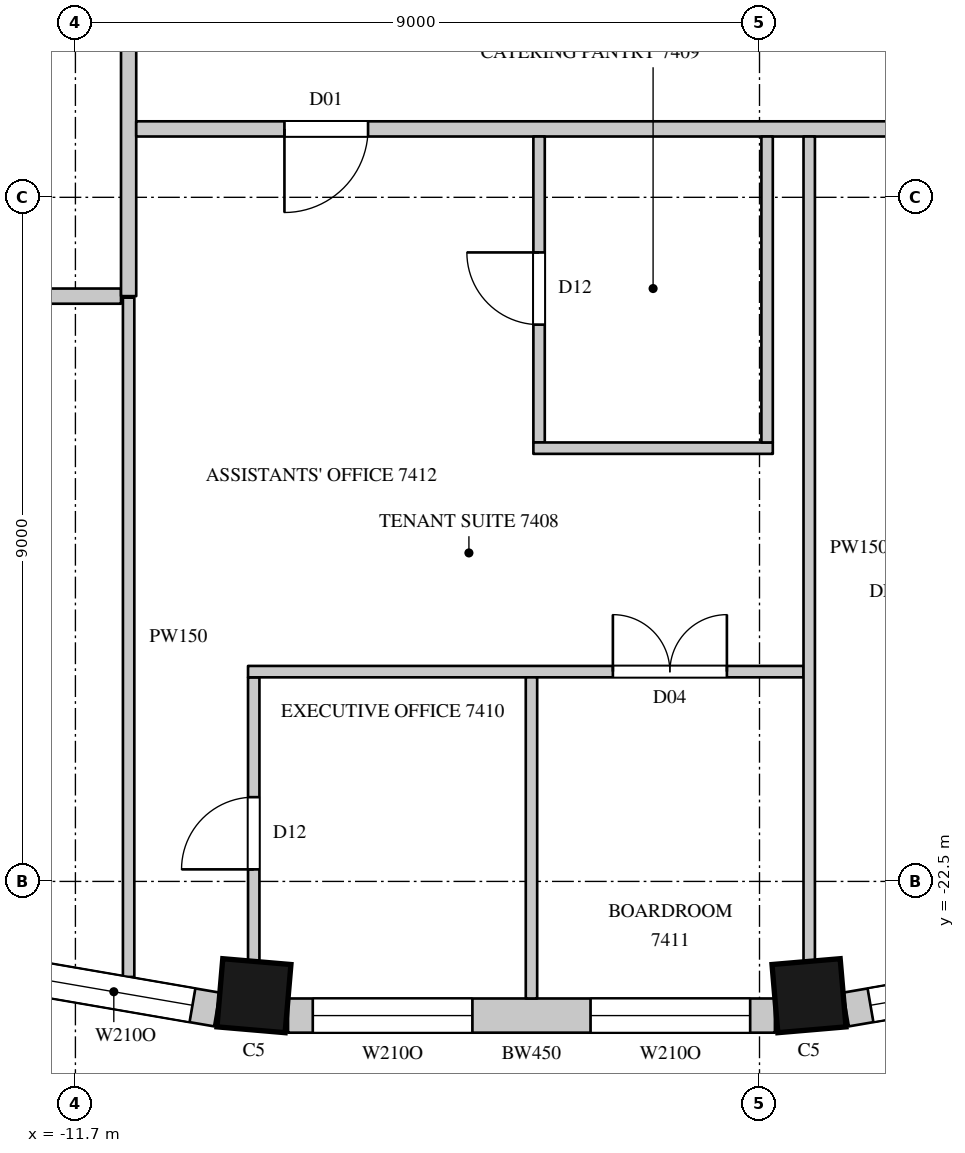
"""IFC4 building model, lengths in metres.
Left out: names, types, materials, properties, quantities, classifications, styles, units other than length and angle.
Written with IfcOpenShell. Run it as: python <this file> out.ifc"""

import sys

from ifc_helpers import new_model, si_unit, direction, frame, frame_2d, origin, origin_2d, place, context, subcontext, project, spatial, rectangle, extrude, element, fill, save


model = new_model("IFC4")
c1 = context("Model", 3, precision=1e-05, world=origin(), true_north=direction((0.0, 1.0)))
c2 = subcontext(c1, "Body", "Model", "MODEL_VIEW")
j1 = project(units=[si_unit("LENGTHUNIT", "METRE"), si_unit("PLANEANGLEUNIT", "RADIAN")], contexts=[c1])
p1 = place(None, origin())
s1 = spatial("IfcSite", under=j1, at=p1, CompositionType="ELEMENT")
p2 = place(p1, origin())
s2 = spatial("IfcBuilding", under=s1, at=p2, CompositionType="ELEMENT")
p3 = place(p2, frame((0.0, 0.0, 325.4)))
s3 = spatial("IfcBuildingStorey", under=s2, at=p3, CompositionType="ELEMENT", Elevation=325.4)
for number, where, z_axis, x_axis in (
    (1, (-9.351, -24.003, 0.0), (0.0, 0.0, 1.0), (0.996, -0.085, 0.0)),
    (2, (-2.049, -24.003, 0.0), (0.0, 0.0, 1.0), (0.996, 0.085, 0.0)),
):
    element("IfcColumn", number, at=place(p3, frame(where, z_axis=z_axis, x_axis=x_axis)), inside=s3, PredefinedType="COLUMN", context=c2, shape_type="SweptSolid", body=[
        extrude(rectangle(XDim=0.9, YDim=0.9, at=origin_2d()), origin(), (0.0, 0.0, 1.0), 4.1),
    ])
p4 = place(p3, frame((-16.157, -23.097, 0.0), z_axis=(0.0, 0.0, 1.0), x_axis=(0.985502073964, -0.169663379113, 0.0)))
e3 = element("IfcWall", 3, at=p4, inside=s3, PredefinedType="SOLIDWALL", context=c2, shape_type="SweptSolid", body=[
    extrude(rectangle(XDim=6.412, YDim=0.45, at=frame_2d((3.206, 0.0))), origin(), (0.0, 0.0, 1.0), 3.8),
])
p5 = place(p4, frame((0.327, 0.0, 1.05)))
e4 = element("IfcOpeningElement", 4, at=p5, cuts=e3, PredefinedType="OPENING", context=c2, shape_type="SweptSolid", body=[
    extrude(rectangle(XDim=2.1, YDim=2.4, at=frame_2d((1.05, 1.2))), frame((0.0, 0.235, 0.0), z_axis=(0.0, -1.0, 0.0), x_axis=(1.0, 0.0, 0.0)), (0.0, 0.0, 1.0), 0.47),
])
p6 = place(p4, frame((3.985, 0.0, 1.05)))
e5 = element("IfcOpeningElement", 5, at=p6, cuts=e3, PredefinedType="OPENING", context=c2, shape_type="SweptSolid", body=[
    extrude(rectangle(XDim=2.1, YDim=2.4, at=frame_2d((1.05, 1.2))), frame((0.0, 0.235, 0.0), z_axis=(0.0, -1.0, 0.0), x_axis=(1.0, 0.0, 0.0)), (0.0, 0.0, 1.0), 0.47),
])
p7 = place(p3, frame((-8.903, -24.265, 0.0), z_axis=(0.0, 0.0, 1.0), x_axis=(1.0, 0.0, 0.0)))
e6 = element("IfcWall", 6, at=p7, inside=s3, PredefinedType="SOLIDWALL", context=c2, shape_type="SweptSolid", body=[
    extrude(rectangle(XDim=6.406, YDim=0.45, at=frame_2d((3.203, 0.0))), origin(), (0.0, 0.0, 1.0), 3.8),
])
p8 = place(p7, frame((0.325, 0.0, 1.05)))
e7 = element("IfcOpeningElement", 7, at=p8, cuts=e6, PredefinedType="OPENING", context=c2, shape_type="SweptSolid", body=[
    extrude(rectangle(XDim=2.1, YDim=2.4, at=frame_2d((1.05, 1.2))), frame((0.0, 0.235, 0.0), z_axis=(0.0, -1.0, 0.0), x_axis=(1.0, 0.0, 0.0)), (0.0, 0.0, 1.0), 0.47),
])
p9 = place(p7, frame((3.98, 0.0, 1.05)))
e8 = element("IfcOpeningElement", 8, at=p9, cuts=e6, PredefinedType="OPENING", context=c2, shape_type="SweptSolid", body=[
    extrude(rectangle(XDim=2.1, YDim=2.4, at=frame_2d((1.05, 1.2))), frame((0.0, 0.235, 0.0), z_axis=(0.0, -1.0, 0.0), x_axis=(1.0, 0.0, 0.0)), (0.0, 0.0, 1.0), 0.47),
])
p10 = place(p3, frame((-1.562, -24.185, 0.0), z_axis=(0.0, 0.0, 1.0), x_axis=(0.985502073964, 0.169663379113, 0.0)))
e9 = element("IfcWall", 9, at=p10, inside=s3, PredefinedType="SOLIDWALL", context=c2, shape_type="SweptSolid", body=[
    extrude(rectangle(XDim=6.412, YDim=0.45, at=frame_2d((3.206, 0.0))), origin(), (0.0, 0.0, 1.0), 3.8),
])
p11 = place(p10, frame((0.327, 0.0, 1.05)))
e10 = element("IfcOpeningElement", 10, at=p11, cuts=e9, PredefinedType="OPENING", context=c2, shape_type="SweptSolid", body=[
    extrude(rectangle(XDim=2.1, YDim=2.4, at=frame_2d((1.05, 1.2))), frame((0.0, 0.235, 0.0), z_axis=(0.0, -1.0, 0.0), x_axis=(1.0, 0.0, 0.0)), (0.0, 0.0, 1.0), 0.47),
])
p12 = place(p10, frame((3.985, 0.0, 1.05)))
e11 = element("IfcOpeningElement", 11, at=p12, cuts=e9, PredefinedType="OPENING", context=c2, shape_type="SweptSolid", body=[
    extrude(rectangle(XDim=2.1, YDim=2.4, at=frame_2d((1.05, 1.2))), frame((0.0, 0.235, 0.0), z_axis=(0.0, -1.0, 0.0), x_axis=(1.0, 0.0, 0.0)), (0.0, 0.0, 1.0), 0.47),
])
p13 = place(p3, frame((-13.97, -14.8, 0.0), z_axis=(0.0, 0.0, 1.0), x_axis=(1.0, 0.0, 0.0)))
e12 = element("IfcWall", 12, at=p13, inside=s3, PredefinedType="PARTITIONING", context=c2, shape_type="SweptSolid", body=[
    extrude(rectangle(XDim=2.87, YDim=0.2, at=frame_2d((1.435, 0.0))), origin(), (0.0, 0.0, 1.0), 3.8),
])
p14 = place(p3, frame((-11.0, -14.8, 0.0), z_axis=(0.0, 0.0, 1.0), x_axis=(0.0, 1.0, 0.0)))
e13 = element("IfcWall", 13, at=p14, inside=s3, PredefinedType="PARTITIONING", context=c2, shape_type="SweptSolid", body=[
    extrude(rectangle(XDim=29.5, YDim=0.2, at=frame_2d((14.75, 0.0))), origin(), (0.0, 0.0, 1.0), 3.8),
])
p15 = place(p14, frame((7.75, 0.0, 0.0)))
e14 = element("IfcOpeningElement", 14, at=p15, cuts=e13, PredefinedType="OPENING", context=c2, shape_type="SweptSolid", body=[
    extrude(rectangle(XDim=1.5, YDim=2.4, at=frame_2d((0.75, 1.2))), frame((0.0, 0.11, 0.0), z_axis=(0.0, -1.0, 0.0), x_axis=(1.0, 0.0, 0.0)), (0.0, 0.0, 1.0), 0.22),
])
p16 = place(p3, frame((-10.9, -12.6, 0.0), z_axis=(0.0, 0.0, 1.0), x_axis=(1.0, 0.0, 0.0)))
e15 = element("IfcWall", 15, at=p16, inside=s3, PredefinedType="PARTITIONING", context=c2, shape_type="SweptSolid", body=[
    extrude(rectangle(XDim=22.6, YDim=0.2, at=frame_2d((11.3, 0.0))), origin(), (0.0, 0.0, 1.0), 3.8),
])
p17 = place(p16, frame((14.1, 0.0, 0.0)))
e16 = element("IfcOpeningElement", 16, at=p17, cuts=e15, PredefinedType="OPENING", context=c2, shape_type="SweptSolid", body=[
    extrude(rectangle(XDim=0.9, YDim=2.2, at=frame_2d((0.45, 1.1))), frame((0.0, 0.11, 0.0), z_axis=(0.0, -1.0, 0.0), x_axis=(1.0, 0.0, 0.0)), (0.0, 0.0, 1.0), 0.22),
])
p18 = place(p16, frame((17.4, 0.0, 0.0)))
e17 = element("IfcOpeningElement", 17, at=p18, cuts=e15, PredefinedType="OPENING", context=c2, shape_type="SweptSolid", body=[
    extrude(rectangle(XDim=0.9, YDim=2.2, at=frame_2d((0.45, 1.1))), frame((0.0, 0.11, 0.0), z_axis=(0.0, -1.0, 0.0), x_axis=(1.0, 0.0, 0.0)), (0.0, 0.0, 1.0), 0.22),
])
p19 = place(p16, frame((20.25, 0.0, 0.0)))
e18 = element("IfcOpeningElement", 18, at=p19, cuts=e15, PredefinedType="OPENING", context=c2, shape_type="SweptSolid", body=[
    extrude(rectangle(XDim=0.9, YDim=2.2, at=frame_2d((0.45, 1.1))), frame((0.0, 0.11, 0.0), z_axis=(0.0, -1.0, 0.0), x_axis=(1.0, 0.0, 0.0)), (0.0, 0.0, 1.0), 0.22),
])
p20 = place(p16, frame((1.95, 0.0, 0.0)))
e19 = element("IfcOpeningElement", 19, at=p20, cuts=e15, PredefinedType="OPENING", context=c2, shape_type="SweptSolid", body=[
    extrude(rectangle(XDim=1.1, YDim=2.4, at=frame_2d((0.55, 1.2))), frame((0.0, 0.11, 0.0), z_axis=(0.0, -1.0, 0.0), x_axis=(1.0, 0.0, 0.0)), (0.0, 0.0, 1.0), 0.22),
])
p21 = place(p16, frame((9.95, 0.0, 0.0)))
e20 = element("IfcOpeningElement", 20, at=p21, cuts=e15, PredefinedType="OPENING", context=c2, shape_type="SweptSolid", body=[
    extrude(rectangle(XDim=1.1, YDim=2.4, at=frame_2d((0.55, 1.2))), frame((0.0, 0.11, 0.0), z_axis=(0.0, -1.0, 0.0), x_axis=(1.0, 0.0, 0.0)), (0.0, 0.0, 1.0), 0.22),
])
p22 = place(p3, frame((-11.0, -23.757, 0.0), z_axis=(0.0, 0.0, 1.0), x_axis=(0.0, 1.0, 0.0)))
e21 = element("IfcWall", 21, at=p22, inside=s3, PredefinedType="PARTITIONING", context=c2, shape_type="SweptSolid", body=[
    extrude(rectangle(XDim=8.937, YDim=0.15, at=frame_2d((4.468, 0.0))), origin(), (0.0, 0.0, 1.0), 3.8),
])
p23 = place(p3, frame((-9.354, -23.542, 0.0), z_axis=(0.0, 0.0, 1.0), x_axis=(0.0, 1.0, 0.0)))
e22 = element("IfcWall", 22, at=p23, inside=s3, PredefinedType="PARTITIONING", context=c2, shape_type="SweptSolid", body=[
    extrude(rectangle(XDim=3.727, YDim=0.15, at=frame_2d((1.863, 0.0))), origin(), (0.0, 0.0, 1.0), 3.8),
])
p24 = place(p23, frame((1.2, 0.0, 0.0)))
e23 = element("IfcOpeningElement", 23, at=p24, cuts=e22, PredefinedType="OPENING", context=c2, shape_type="SweptSolid", body=[
    extrude(rectangle(XDim=0.95, YDim=2.2, at=frame_2d((0.475, 1.1))), frame((0.0, 0.085, 0.0), z_axis=(0.0, -1.0, 0.0), x_axis=(1.0, 0.0, 0.0)), (0.0, 0.0, 1.0), 0.17),
])
p25 = place(p3, frame((-9.429, -19.74, 0.0), z_axis=(0.0, 0.0, 1.0), x_axis=(1.0, 0.0, 0.0)))
e24 = element("IfcWall", 24, at=p25, inside=s3, PredefinedType="PARTITIONING", context=c2, shape_type="SweptSolid", body=[
    extrude(rectangle(XDim=7.308, YDim=0.15, at=frame_2d((3.654, 0.0))), origin(), (0.0, 0.0, 1.0), 3.8),
])
p26 = place(p25, frame((4.8, 0.0, 0.0)))
e25 = element("IfcOpeningElement", 25, at=p26, cuts=e24, PredefinedType="OPENING", context=c2, shape_type="SweptSolid", body=[
    extrude(rectangle(XDim=1.5, YDim=2.2, at=frame_2d((0.75, 1.1))), frame((0.0, 0.085, 0.0), z_axis=(0.0, -1.0, 0.0), x_axis=(1.0, 0.0, 0.0)), (0.0, 0.0, 1.0), 0.17),
])
p27 = place(p3, frame((-5.7, -24.04, 0.0), z_axis=(0.0, 0.0, 1.0), x_axis=(0.0, 1.0, 0.0)))
e26 = element("IfcWall", 26, at=p27, inside=s3, PredefinedType="PARTITIONING", context=c2, shape_type="SweptSolid", body=[
    extrude(rectangle(XDim=4.225, YDim=0.15, at=frame_2d((2.113, 0.0))), origin(), (0.0, 0.0, 1.0), 3.8),
])
p28 = place(p3, frame((-5.6, -16.725, 0.0), z_axis=(0.0, 0.0, 1.0), x_axis=(0.0, 1.0, 0.0)))
e27 = element("IfcWall", 27, at=p28, inside=s3, PredefinedType="PARTITIONING", context=c2, shape_type="SweptSolid", body=[
    extrude(rectangle(XDim=4.025, YDim=0.15, at=frame_2d((2.013, 0.0))), origin(), (0.0, 0.0, 1.0), 3.8),
])
p29 = place(p28, frame((1.55, 0.0, 0.0)))
e28 = element("IfcOpeningElement", 28, at=p29, cuts=e27, PredefinedType="OPENING", context=c2, shape_type="SweptSolid", body=[
    extrude(rectangle(XDim=0.95, YDim=2.2, at=frame_2d((0.475, 1.1))), frame((0.0, 0.085, 0.0), z_axis=(0.0, -1.0, 0.0), x_axis=(1.0, 0.0, 0.0)), (0.0, 0.0, 1.0), 0.17),
])
p30 = place(p3, frame((-5.675, -16.8, 0.0), z_axis=(0.0, 0.0, 1.0), x_axis=(1.0, 0.0, 0.0)))
e29 = element("IfcWall", 29, at=p30, inside=s3, PredefinedType="PARTITIONING", context=c2, shape_type="SweptSolid", body=[
    extrude(rectangle(XDim=3.15, YDim=0.15, at=frame_2d((1.575, 0.0))), origin(), (0.0, 0.0, 1.0), 3.8),
])
p31 = place(p3, frame((-2.6, -16.725, 0.0), z_axis=(0.0, 0.0, 1.0), x_axis=(0.0, 1.0, 0.0)))
e30 = element("IfcWall", 30, at=p31, inside=s3, PredefinedType="PARTITIONING", context=c2, shape_type="SweptSolid", body=[
    extrude(rectangle(XDim=4.025, YDim=0.15, at=frame_2d((2.013, 0.0))), origin(), (0.0, 0.0, 1.0), 3.8),
])
p32 = place(p3, frame((-2.046, -23.542, 0.0), z_axis=(0.0, 0.0, 1.0), x_axis=(0.0, 1.0, 0.0)))
e31 = element("IfcWall", 31, at=p32, inside=s3, PredefinedType="PARTITIONING", context=c2, shape_type="SweptSolid", body=[
    extrude(rectangle(XDim=10.842, YDim=0.15, at=frame_2d((5.421, 0.0))), origin(), (0.0, 0.0, 1.0), 3.8),
])
p33 = place(p6, origin())
e32 = element("IfcWindow", 32, at=p33, inside=s3, PartitioningType="SINGLE_PANEL", PredefinedType="WINDOW", context=c2, shape_type="SweptSolid", body=[
    extrude(rectangle(XDim=2.1, YDim=2.4, at=frame_2d((1.05, 1.2))), frame((0.0, 0.135, 0.0), z_axis=(0.0, -1.0, 0.0), x_axis=(1.0, 0.0, 0.0)), (0.0, 0.0, 1.0), 0.06),
])
fill(e5, e32)
p34 = place(p8, origin())
e33 = element("IfcWindow", 33, at=p34, inside=s3, PartitioningType="SINGLE_PANEL", PredefinedType="WINDOW", context=c2, shape_type="SweptSolid", body=[
    extrude(rectangle(XDim=2.1, YDim=2.4, at=frame_2d((1.05, 1.2))), frame((0.0, 0.135, 0.0), z_axis=(0.0, -1.0, 0.0), x_axis=(1.0, 0.0, 0.0)), (0.0, 0.0, 1.0), 0.06),
])
fill(e7, e33)
p35 = place(p9, origin())
e34 = element("IfcWindow", 34, at=p35, inside=s3, PartitioningType="SINGLE_PANEL", PredefinedType="WINDOW", context=c2, shape_type="SweptSolid", body=[
    extrude(rectangle(XDim=2.1, YDim=2.4, at=frame_2d((1.05, 1.2))), frame((0.0, 0.135, 0.0), z_axis=(0.0, -1.0, 0.0), x_axis=(1.0, 0.0, 0.0)), (0.0, 0.0, 1.0), 0.06),
])
fill(e8, e34)
p36 = place(p11, origin())
e35 = element("IfcWindow", 35, at=p36, inside=s3, PartitioningType="SINGLE_PANEL", PredefinedType="WINDOW", context=c2, shape_type="SweptSolid", body=[
    extrude(rectangle(XDim=2.1, YDim=2.4, at=frame_2d((1.05, 1.2))), frame((0.0, 0.135, 0.0), z_axis=(0.0, -1.0, 0.0), x_axis=(1.0, 0.0, 0.0)), (0.0, 0.0, 1.0), 0.06),
])
fill(e10, e35)
p37 = place(p20, origin())
e36 = element("IfcDoor", 36, at=p37, inside=s3, OperationType="SINGLE_SWING_RIGHT", PredefinedType="DOOR", context=c2, shape_type="SweptSolid", body=[
    extrude(rectangle(XDim=1.1, YDim=2.4, at=frame_2d((0.55, 1.2))), frame((0.0, 0.025, 0.0), z_axis=(0.0, -1.0, 0.0), x_axis=(1.0, 0.0, 0.0)), (0.0, 0.0, 1.0), 0.05),
])
fill(e19, e36)
p38 = place(p29, origin())
e37 = element("IfcDoor", 37, at=p38, inside=s3, OperationType="SINGLE_SWING_RIGHT", PredefinedType="DOOR", context=c2, shape_type="SweptSolid", body=[
    extrude(rectangle(XDim=0.95, YDim=2.2, at=frame_2d((0.475, 1.1))), frame((0.0, 0.025, 0.0), z_axis=(0.0, -1.0, 0.0), x_axis=(1.0, 0.0, 0.0)), (0.0, 0.0, 1.0), 0.05),
])
fill(e28, e37)
p39 = place(p24, origin())
e38 = element("IfcDoor", 38, at=p39, inside=s3, OperationType="SINGLE_SWING_LEFT", PredefinedType="DOOR", context=c2, shape_type="SweptSolid", body=[
    extrude(rectangle(XDim=0.95, YDim=2.2, at=frame_2d((0.475, 1.1))), frame((0.0, 0.025, 0.0), z_axis=(0.0, -1.0, 0.0), x_axis=(1.0, 0.0, 0.0)), (0.0, 0.0, 1.0), 0.05),
])
fill(e23, e38)
p40 = place(p26, origin())
e39 = element("IfcDoor", 39, at=p40, inside=s3, OperationType="DOUBLE_DOOR_SINGLE_SWING", PredefinedType="DOOR", context=c2, shape_type="SweptSolid", body=[
    extrude(rectangle(XDim=1.5, YDim=2.2, at=frame_2d((0.75, 1.1))), frame((0.0, 0.025, 0.0), z_axis=(0.0, -1.0, 0.0), x_axis=(1.0, 0.0, 0.0)), (0.0, 0.0, 1.0), 0.05),
])
fill(e25, e39)
save(model, sys.argv[1])
